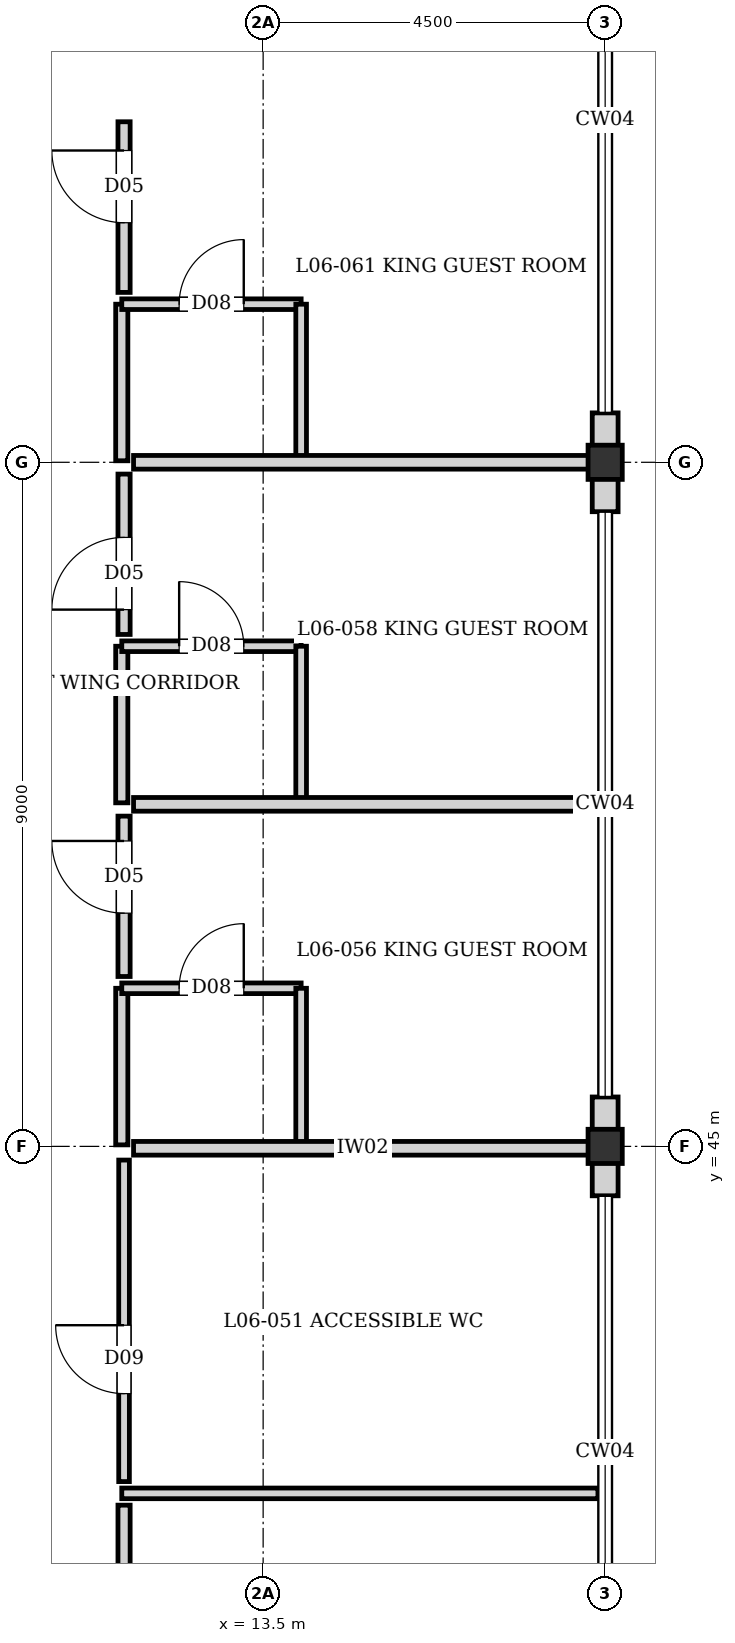
"""IFC4 building model, lengths in metres.
Left out: names, types, materials, properties, quantities, classifications, styles, units other than length and angle.
Written with IfcOpenShell. Run it as: python <this file> out.ifc"""

import sys

from ifc_helpers import new_model, si_unit, direction, frame, frame_2d, origin, origin_2d, place, context, subcontext, project, spatial, rectangle, extrude, element, fill, save


model = new_model("IFC4")
c1 = context("Model", 3, precision=1e-05, world=origin(), true_north=direction((0.0, 1.0)))
c2 = subcontext(c1, "Body", "Model", "MODEL_VIEW")
j1 = project(units=[si_unit("LENGTHUNIT", "METRE"), si_unit("PLANEANGLEUNIT", "RADIAN")], contexts=[c1])
p1 = place(None, origin())
s1 = spatial("IfcSite", under=j1, at=p1, CompositionType="ELEMENT")
p2 = place(p1, origin())
s2 = spatial("IfcBuilding", under=s1, at=p2, CompositionType="ELEMENT")
p3 = place(p2, frame((0.0, 0.0, 20.64)))
s3 = spatial("IfcBuildingStorey", under=s2, at=p3, CompositionType="ELEMENT", Elevation=20.64)
for number, where, z_axis, x_axis in (
    (1, (18.0, 45.0, 0.0), (0.0, 0.0, 1.0), (1.0, 0.0, 0.0)),
    (2, (18.0, 54.0, 0.0), (0.0, 0.0, 1.0), (1.0, 0.0, 0.0)),
):
    element("IfcColumn", number, at=place(p3, frame(where, z_axis=z_axis, x_axis=x_axis)), inside=s3, PredefinedType="COLUMN", context=c2, shape_type="SweptSolid", body=[
        extrude(rectangle(XDim=0.45, YDim=0.45, at=origin_2d()), origin(), (0.0, 0.0, 1.0), 3.04),
    ])
p4 = place(p3, frame((18.0, 54.65, 0.0), z_axis=(0.0, 0.0, 1.0), x_axis=(0.0, -1.0, 0.0)))
e3 = element("IfcWall", 3, at=p4, inside=s3, PredefinedType="SOLIDWALL", context=c2, shape_type="SweptSolid", body=[
    extrude(rectangle(XDim=0.65, YDim=0.34, at=frame_2d((0.325, 0.0))), origin(), (0.0, 0.0, 1.0), 2.38),
])
for number, where, z_axis, x_axis in (
    (4, (18.0, 54.0, 0.0), (0.0, 0.0, 1.0), (0.0, -1.0, 0.0)),
    (5, (18.0, 45.65, 0.0), (0.0, 0.0, 1.0), (0.0, -1.0, 0.0)),
):
    element("IfcWall", number, at=place(p3, frame(where, z_axis=z_axis, x_axis=x_axis)), inside=s3, PredefinedType="SOLIDWALL", context=c2, shape_type="SweptSolid", body=[
        extrude(rectangle(XDim=0.65, YDim=0.34, at=frame_2d((0.325, 0.0))), origin(), (0.0, 0.0, 1.0), 2.42),
    ])
p5 = place(p3, frame((18.0, 45.0, 0.0), z_axis=(0.0, 0.0, 1.0), x_axis=(0.0, -1.0, 0.0)))
e6 = element("IfcWall", 6, at=p5, inside=s3, PredefinedType="SOLIDWALL", context=c2, shape_type="SweptSolid", body=[
    extrude(rectangle(XDim=0.65, YDim=0.34, at=frame_2d((0.325, 0.0))), origin(), (0.0, 0.0, 1.0), 2.48),
])
p6 = place(p3, frame((11.64, 45.02, 0.0), z_axis=(0.0, 0.0, 1.0), x_axis=(0.0, 1.0, 0.0)))
e7 = element("IfcWall", 7, at=p6, inside=s3, PredefinedType="PARTITIONING", context=c2, shape_type="SweptSolid", body=[
    extrude(rectangle(XDim=2.06, YDim=0.16, at=frame_2d((1.03, 0.0))), origin(), (0.0, 0.0, 1.0), 2.82),
])
p7 = place(p3, frame((11.64, 47.08, 0.0), z_axis=(0.0, 0.0, 1.0), x_axis=(1.0, 0.0, 0.0)))
e8 = element("IfcWall", 8, at=p7, inside=s3, PredefinedType="PLUMBINGWALL", context=c2, shape_type="SweptSolid", body=[
    extrude(rectangle(XDim=2.36, YDim=0.14, at=frame_2d((1.18, 0.0))), origin(), (0.0, 0.0, 1.0), 2.82),
])
p8 = place(p7, frame((0.755, 0.0, 0.0)))
e9 = element("IfcOpeningElement", 9, at=p8, cuts=e8, PredefinedType="OPENING", context=c2, shape_type="SweptSolid", body=[
    extrude(rectangle(XDim=0.85, YDim=2.04, at=frame_2d((0.425, 1.02))), frame((0.0, 0.08, 0.0), z_axis=(0.0, -1.0, 0.0), x_axis=(1.0, 0.0, 0.0)), (0.0, 0.0, 1.0), 0.16),
])
p9 = place(p3, frame((14.0, 45.02, 0.0), z_axis=(0.0, 0.0, 1.0), x_axis=(0.0, 1.0, 0.0)))
e10 = element("IfcWall", 10, at=p9, inside=s3, PredefinedType="PLUMBINGWALL", context=c2, shape_type="SweptSolid", body=[
    extrude(rectangle(XDim=2.06, YDim=0.14, at=frame_2d((1.03, 0.0))), origin(), (0.0, 0.0, 1.0), 2.82),
])
p10 = place(p3, frame((11.64, 49.52, 0.0), z_axis=(0.0, 0.0, 1.0), x_axis=(0.0, 1.0, 0.0)))
e11 = element("IfcWall", 11, at=p10, inside=s3, PredefinedType="PARTITIONING", context=c2, shape_type="SweptSolid", body=[
    extrude(rectangle(XDim=2.06, YDim=0.16, at=frame_2d((1.03, 0.0))), origin(), (0.0, 0.0, 1.0), 2.82),
])
p11 = place(p3, frame((11.64, 51.58, 0.0), z_axis=(0.0, 0.0, 1.0), x_axis=(1.0, 0.0, 0.0)))
e12 = element("IfcWall", 12, at=p11, inside=s3, PredefinedType="PLUMBINGWALL", context=c2, shape_type="SweptSolid", body=[
    extrude(rectangle(XDim=2.36, YDim=0.14, at=frame_2d((1.18, 0.0))), origin(), (0.0, 0.0, 1.0), 2.82),
])
p12 = place(p11, frame((0.755, 0.0, 0.0)))
e13 = element("IfcOpeningElement", 13, at=p12, cuts=e12, PredefinedType="OPENING", context=c2, shape_type="SweptSolid", body=[
    extrude(rectangle(XDim=0.85, YDim=2.04, at=frame_2d((0.425, 1.02))), frame((0.0, 0.08, 0.0), z_axis=(0.0, -1.0, 0.0), x_axis=(1.0, 0.0, 0.0)), (0.0, 0.0, 1.0), 0.16),
])
p13 = place(p3, frame((14.0, 49.52, 0.0), z_axis=(0.0, 0.0, 1.0), x_axis=(0.0, 1.0, 0.0)))
e14 = element("IfcWall", 14, at=p13, inside=s3, PredefinedType="PLUMBINGWALL", context=c2, shape_type="SweptSolid", body=[
    extrude(rectangle(XDim=2.06, YDim=0.14, at=frame_2d((1.03, 0.0))), origin(), (0.0, 0.0, 1.0), 2.82),
])
p14 = place(p3, frame((11.64, 54.02, 0.0), z_axis=(0.0, 0.0, 1.0), x_axis=(0.0, 1.0, 0.0)))
e15 = element("IfcWall", 15, at=p14, inside=s3, PredefinedType="PARTITIONING", context=c2, shape_type="SweptSolid", body=[
    extrude(rectangle(XDim=2.06, YDim=0.16, at=frame_2d((1.03, 0.0))), origin(), (0.0, 0.0, 1.0), 2.82),
])
p15 = place(p3, frame((11.64, 56.08, 0.0), z_axis=(0.0, 0.0, 1.0), x_axis=(1.0, 0.0, 0.0)))
e16 = element("IfcWall", 16, at=p15, inside=s3, PredefinedType="PLUMBINGWALL", context=c2, shape_type="SweptSolid", body=[
    extrude(rectangle(XDim=2.36, YDim=0.14, at=frame_2d((1.18, 0.0))), origin(), (0.0, 0.0, 1.0), 2.82),
])
p16 = place(p15, frame((0.755, 0.0, 0.0)))
e17 = element("IfcOpeningElement", 17, at=p16, cuts=e16, PredefinedType="OPENING", context=c2, shape_type="SweptSolid", body=[
    extrude(rectangle(XDim=0.85, YDim=2.04, at=frame_2d((0.425, 1.02))), frame((0.0, 0.08, 0.0), z_axis=(0.0, -1.0, 0.0), x_axis=(1.0, 0.0, 0.0)), (0.0, 0.0, 1.0), 0.16),
])
p17 = place(p3, frame((14.0, 54.02, 0.0), z_axis=(0.0, 0.0, 1.0), x_axis=(0.0, 1.0, 0.0)))
e18 = element("IfcWall", 18, at=p17, inside=s3, PredefinedType="PLUMBINGWALL", context=c2, shape_type="SweptSolid", body=[
    extrude(rectangle(XDim=2.06, YDim=0.14, at=frame_2d((1.03, 0.0))), origin(), (0.0, 0.0, 1.0), 2.82),
])
p18 = place(p3, frame((11.795, 44.975, 0.0), z_axis=(0.0, 0.0, 1.0), x_axis=(1.0, 0.0, 0.0)))
e19 = element("IfcWall", 19, at=p18, inside=s3, PredefinedType="PARTITIONING", context=c2, shape_type="SweptSolid", body=[
    extrude(rectangle(XDim=6.03, YDim=0.18, at=frame_2d((3.015, 0.0))), origin(), (0.0, 0.0, 1.0), 2.48),
])
p19 = place(p3, frame((11.795, 49.5, 0.0), z_axis=(0.0, 0.0, 1.0), x_axis=(1.0, 0.0, 0.0)))
e20 = element("IfcWall", 20, at=p19, inside=s3, PredefinedType="PARTITIONING", context=c2, shape_type="SweptSolid", body=[
    extrude(rectangle(XDim=6.11, YDim=0.18, at=frame_2d((3.055, 0.0))), origin(), (0.0, 0.0, 1.0), 2.82),
])
p20 = place(p3, frame((11.795, 54.0, 0.0), z_axis=(0.0, 0.0, 1.0), x_axis=(1.0, 0.0, 0.0)))
e21 = element("IfcWall", 21, at=p20, inside=s3, PredefinedType="PARTITIONING", context=c2, shape_type="SweptSolid", body=[
    extrude(rectangle(XDim=6.03, YDim=0.18, at=frame_2d((3.015, 0.0))), origin(), (0.0, 0.0, 1.0), 2.28),
])
p21 = place(p3, frame((11.64, 40.435, 0.0), z_axis=(0.0, 0.0, 1.0), x_axis=(1.0, 0.0, 0.0)))
e22 = element("IfcWall", 22, at=p21, inside=s3, PredefinedType="PLUMBINGWALL", context=c2, shape_type="SweptSolid", body=[
    extrude(rectangle(XDim=6.265, YDim=0.14, at=frame_2d((3.133, 0.0))), origin(), (0.0, 0.0, 1.0), 2.82),
])
p22 = place(p3, frame((11.67, 36.155, 0.0), z_axis=(0.0, 0.0, 1.0), x_axis=(0.0, 1.0, 0.0)))
e23 = element("IfcWall", 23, at=p22, inside=s3, PredefinedType="PARTITIONING", context=c2, shape_type="SweptSolid", body=[
    extrude(rectangle(XDim=4.125, YDim=0.16, at=frame_2d((2.062, 0.0))), origin(), (0.0, 0.0, 1.0), 2.82),
])
p23 = place(p22, frame((2.058, 0.0, 0.0)))
e24 = element("IfcOpeningElement", 24, at=p23, cuts=e23, PredefinedType="OPENING", context=c2, shape_type="SweptSolid", body=[
    extrude(rectangle(XDim=1.0, YDim=2.1, at=frame_2d((0.5, 1.05))), frame((0.0, 0.09, 0.0), z_axis=(0.0, -1.0, 0.0), x_axis=(1.0, 0.0, 0.0)), (0.0, 0.0, 1.0), 0.18),
])
p24 = place(p3, frame((11.67, 40.59, 0.0), z_axis=(0.0, 0.0, 1.0), x_axis=(0.0, 1.0, 0.0)))
e25 = element("IfcWall", 25, at=p24, inside=s3, PredefinedType="PLUMBINGWALL", context=c2, shape_type="SweptSolid", body=[
    extrude(rectangle(XDim=4.23, YDim=0.14, at=frame_2d((2.115, 0.0))), origin(), (0.0, 0.0, 1.0), 2.82),
])
p25 = place(p24, frame((1.157, 0.0, 0.0)))
e26 = element("IfcOpeningElement", 26, at=p25, cuts=e25, PredefinedType="OPENING", context=c2, shape_type="SweptSolid", body=[
    extrude(rectangle(XDim=0.9, YDim=2.1, at=frame_2d((0.45, 1.05))), frame((0.0, 0.08, 0.0), z_axis=(0.0, -1.0, 0.0), x_axis=(1.0, 0.0, 0.0)), (0.0, 0.0, 1.0), 0.16),
])
p26 = place(p3, frame((11.67, 47.235, 0.0), z_axis=(0.0, 0.0, 1.0), x_axis=(0.0, 1.0, 0.0)))
e27 = element("IfcWall", 27, at=p26, inside=s3, PredefinedType="PARTITIONING", context=c2, shape_type="SweptSolid", body=[
    extrude(rectangle(XDim=2.11, YDim=0.16, at=frame_2d((1.055, 0.0))), origin(), (0.0, 0.0, 1.0), 2.82),
])
p27 = place(p26, frame((0.833, 0.0, 0.0)))
e28 = element("IfcOpeningElement", 28, at=p27, cuts=e27, PredefinedType="OPENING", context=c2, shape_type="SweptSolid", body=[
    extrude(rectangle(XDim=0.95, YDim=2.15, at=frame_2d((0.475, 1.075))), frame((0.0, 0.09, 0.0), z_axis=(0.0, -1.0, 0.0), x_axis=(1.0, 0.0, 0.0)), (0.0, 0.0, 1.0), 0.18),
])
p28 = place(p3, frame((11.67, 51.735, 0.0), z_axis=(0.0, 0.0, 1.0), x_axis=(0.0, 1.0, 0.0)))
e29 = element("IfcWall", 29, at=p28, inside=s3, PredefinedType="PARTITIONING", context=c2, shape_type="SweptSolid", body=[
    extrude(rectangle(XDim=2.11, YDim=0.16, at=frame_2d((1.055, 0.0))), origin(), (0.0, 0.0, 1.0), 2.82),
])
p29 = place(p28, frame((0.327, 0.0, 0.0)))
e30 = element("IfcOpeningElement", 30, at=p29, cuts=e29, PredefinedType="OPENING", context=c2, shape_type="SweptSolid", body=[
    extrude(rectangle(XDim=0.95, YDim=2.15, at=frame_2d((0.475, 1.075))), frame((0.0, 0.09, 0.0), z_axis=(0.0, -1.0, 0.0), x_axis=(1.0, 0.0, 0.0)), (0.0, 0.0, 1.0), 0.18),
])
p30 = place(p3, frame((11.67, 56.235, 0.0), z_axis=(0.0, 0.0, 1.0), x_axis=(0.0, 1.0, 0.0)))
e31 = element("IfcWall", 31, at=p30, inside=s3, PredefinedType="PARTITIONING", context=c2, shape_type="SweptSolid", body=[
    extrude(rectangle(XDim=2.245, YDim=0.16, at=frame_2d((1.123, 0.0))), origin(), (0.0, 0.0, 1.0), 2.82),
])
p31 = place(p30, frame((0.917, 0.0, 0.0)))
e32 = element("IfcOpeningElement", 32, at=p31, cuts=e31, PredefinedType="OPENING", context=c2, shape_type="SweptSolid", body=[
    extrude(rectangle(XDim=0.95, YDim=2.15, at=frame_2d((0.475, 1.075))), frame((0.0, 0.09, 0.0), z_axis=(0.0, -1.0, 0.0), x_axis=(1.0, 0.0, 0.0)), (0.0, 0.0, 1.0), 0.18),
])
p32 = place(p8, origin())
e33 = element("IfcDoor", 33, at=p32, inside=s3, OperationType="SINGLE_SWING_RIGHT", PredefinedType="DOOR", context=c2, shape_type="SweptSolid", body=[
    extrude(rectangle(XDim=0.85, YDim=2.04, at=frame_2d((0.425, 1.02))), frame((0.0, 0.025, 0.0), z_axis=(0.0, -1.0, 0.0), x_axis=(1.0, 0.0, 0.0)), (0.0, 0.0, 1.0), 0.05),
])
fill(e9, e33)
p33 = place(p12, origin())
e34 = element("IfcDoor", 34, at=p33, inside=s3, OperationType="SINGLE_SWING_LEFT", PredefinedType="DOOR", context=c2, shape_type="SweptSolid", body=[
    extrude(rectangle(XDim=0.85, YDim=2.04, at=frame_2d((0.425, 1.02))), frame((0.0, 0.025, 0.0), z_axis=(0.0, -1.0, 0.0), x_axis=(1.0, 0.0, 0.0)), (0.0, 0.0, 1.0), 0.05),
])
fill(e13, e34)
p34 = place(p16, origin())
e35 = element("IfcDoor", 35, at=p34, inside=s3, OperationType="SINGLE_SWING_RIGHT", PredefinedType="DOOR", context=c2, shape_type="SweptSolid", body=[
    extrude(rectangle(XDim=0.85, YDim=2.04, at=frame_2d((0.425, 1.02))), frame((0.0, 0.025, 0.0), z_axis=(0.0, -1.0, 0.0), x_axis=(1.0, 0.0, 0.0)), (0.0, 0.0, 1.0), 0.05),
])
fill(e17, e35)
p35 = place(p25, origin())
e36 = element("IfcDoor", 36, at=p35, inside=s3, OperationType="SINGLE_SWING_RIGHT", PredefinedType="DOOR", context=c2, shape_type="SweptSolid", body=[
    extrude(rectangle(XDim=0.9, YDim=2.1, at=frame_2d((0.45, 1.05))), frame((0.0, 0.025, 0.0), z_axis=(0.0, -1.0, 0.0), x_axis=(1.0, 0.0, 0.0)), (0.0, 0.0, 1.0), 0.05),
])
fill(e26, e36)
p36 = place(p27, origin())
e37 = element("IfcDoor", 37, at=p36, inside=s3, OperationType="SINGLE_SWING_RIGHT", PredefinedType="DOOR", context=c2, shape_type="SweptSolid", body=[
    extrude(rectangle(XDim=0.95, YDim=2.15, at=frame_2d((0.475, 1.075))), frame((0.0, 0.025, 0.0), z_axis=(0.0, -1.0, 0.0), x_axis=(1.0, 0.0, 0.0)), (0.0, 0.0, 1.0), 0.05),
])
fill(e28, e37)
p37 = place(p29, origin())
e38 = element("IfcDoor", 38, at=p37, inside=s3, OperationType="SINGLE_SWING_LEFT", PredefinedType="DOOR", context=c2, shape_type="SweptSolid", body=[
    extrude(rectangle(XDim=0.95, YDim=2.15, at=frame_2d((0.475, 1.075))), frame((0.0, 0.025, 0.0), z_axis=(0.0, -1.0, 0.0), x_axis=(1.0, 0.0, 0.0)), (0.0, 0.0, 1.0), 0.05),
])
fill(e30, e38)
p38 = place(p31, origin())
e39 = element("IfcDoor", 39, at=p38, inside=s3, OperationType="SINGLE_SWING_RIGHT", PredefinedType="DOOR", context=c2, shape_type="SweptSolid", body=[
    extrude(rectangle(XDim=0.95, YDim=2.15, at=frame_2d((0.475, 1.075))), frame((0.0, 0.025, 0.0), z_axis=(0.0, -1.0, 0.0), x_axis=(1.0, 0.0, 0.0)), (0.0, 0.0, 1.0), 0.05),
])
fill(e32, e39)
save(model, sys.argv[1])
